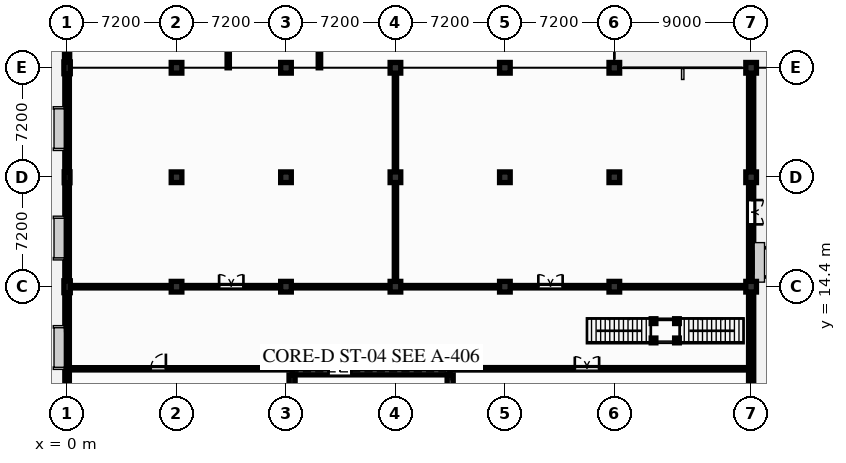
"""IFC4 building model, lengths in metres.
Left out: names, types, materials, properties, quantities, classifications, styles, units other than length and angle.
Written with IfcOpenShell. Run it as: python <this file> out.ifc"""

import sys

from ifc_helpers import new_model, si_unit, direction, frame, frame_2d, origin, origin_2d, place, context, subcontext, project, spatial, rectangle, i_section, extrude, element, fill, save


model = new_model("IFC4")
c1 = context("Model", 3, precision=1e-05, world=origin(), true_north=direction((0.0, 1.0)))
c2 = subcontext(c1, "Body", "Model", "MODEL_VIEW")
j1 = project(units=[si_unit("LENGTHUNIT", "METRE"), si_unit("PLANEANGLEUNIT", "RADIAN")], contexts=[c1])
p1 = place(None, origin())
s1 = spatial("IfcSite", under=j1, at=p1, CompositionType="ELEMENT")
p2 = place(p1, origin())
s2 = spatial("IfcBuilding", under=s1, at=p2, CompositionType="ELEMENT")
p3 = place(p2, origin())
s3 = spatial("IfcBuildingStorey", under=s2, at=p3, CompositionType="ELEMENT", Elevation=0.0)
p4 = place(p3, frame((0.0, 14.4, 0.0), z_axis=(0.0, 0.0, 1.0), x_axis=(1.0, 0.0, 0.0)))
e1 = element("IfcColumn", 1, at=p4, inside=s3, PredefinedType="PILASTER", context=c2, shape_type="SweptSolid", body=[
    extrude(rectangle(XDim=0.42, YDim=0.78, at=origin_2d()), origin(), (0.0, 0.0, 1.0), 5.1),
])
p5 = place(p3, frame((0.0, 21.6, 0.0), z_axis=(0.0, 0.0, 1.0), x_axis=(1.0, 0.0, 0.0)))
e2 = element("IfcColumn", 2, at=p5, inside=s3, PredefinedType="PILASTER", context=c2, shape_type="SweptSolid", body=[
    extrude(rectangle(XDim=0.38, YDim=0.72, at=origin_2d()), origin(), (0.0, 0.0, 1.0), 5.1),
])
p6 = place(p3, frame((0.0, 28.8, 0.0), z_axis=(0.0, 0.0, 1.0), x_axis=(1.0, 0.0, 0.0)))
e3 = element("IfcColumn", 3, at=p6, inside=s3, PredefinedType="PILASTER", context=c2, shape_type="SweptSolid", body=[
    extrude(rectangle(XDim=0.42, YDim=0.78, at=origin_2d()), origin(), (0.0, 0.0, 1.0), 5.1),
])
for number, where, z_axis, x_axis in (
    (4, (7.2, 14.4, 0.0), (0.0, 0.0, 1.0), (1.0, 0.0, 0.0)),
    (5, (7.2, 21.6, 0.0), (0.0, 0.0, 1.0), (1.0, 0.0, 0.0)),
    (6, (7.2, 28.8, 0.0), (0.0, 0.0, 1.0), (1.0, 0.0, 0.0)),
    (7, (14.4, 14.4, 0.0), (0.0, 0.0, 1.0), (1.0, 0.0, 0.0)),
    (8, (14.4, 21.6, 0.0), (0.0, 0.0, 1.0), (1.0, 0.0, 0.0)),
    (9, (14.4, 28.8, 0.0), (0.0, 0.0, 1.0), (1.0, 0.0, 0.0)),
    (10, (21.6, 14.4, 0.0), (0.0, 0.0, 1.0), (1.0, 0.0, 0.0)),
    (11, (21.6, 21.6, 0.0), (0.0, 0.0, 1.0), (1.0, 0.0, 0.0)),
    (12, (21.6, 28.8, 0.0), (0.0, 0.0, 1.0), (1.0, 0.0, 0.0)),
    (13, (28.8, 14.4, 0.0), (0.0, 0.0, 1.0), (1.0, 0.0, 0.0)),
    (14, (28.8, 21.6, 0.0), (0.0, 0.0, 1.0), (1.0, 0.0, 0.0)),
    (15, (28.8, 28.8, 0.0), (0.0, 0.0, 1.0), (1.0, 0.0, 0.0)),
    (16, (36.0, 14.4, 0.0), (0.0, 0.0, 1.0), (1.0, 0.0, 0.0)),
    (17, (36.0, 21.6, 0.0), (0.0, 0.0, 1.0), (1.0, 0.0, 0.0)),
    (18, (36.0, 28.8, 0.0), (0.0, 0.0, 1.0), (1.0, 0.0, 0.0)),
    (19, (45.0, 14.4, 0.0), (0.0, 0.0, 1.0), (1.0, 0.0, 0.0)),
    (20, (45.0, 21.6, 0.0), (0.0, 0.0, 1.0), (1.0, 0.0, 0.0)),
    (21, (45.0, 28.8, 0.0), (0.0, 0.0, 1.0), (1.0, 0.0, 0.0)),
):
    element("IfcColumn", number, at=place(p3, frame(where, z_axis=z_axis, x_axis=x_axis)), inside=s3, PredefinedType="COLUMN", context=c2, shape_type="SweptSolid", body=[
        extrude(rectangle(XDim=0.7, YDim=0.7, at=origin_2d()), origin(), (0.0, 0.0, 1.0), 5.1),
    ])
for number, where, z_axis, x_axis in (
    (22, (38.58, 10.865, 0.0), (0.0, 0.0, 1.0), (1.0, 0.0, 0.0)),
    (23, (40.12, 10.865, 0.0), (0.0, 0.0, 1.0), (1.0, 0.0, 0.0)),
    (24, (38.58, 12.135, 0.0), (0.0, 0.0, 1.0), (1.0, 0.0, 0.0)),
    (25, (40.12, 12.135, 0.0), (0.0, 0.0, 1.0), (1.0, 0.0, 0.0)),
):
    element("IfcColumn", number, at=place(p3, frame(where, z_axis=z_axis, x_axis=x_axis)), inside=s3, PredefinedType="COLUMN", context=c2, shape_type="SweptSolid", body=[
        extrude(i_section(OverallWidth=0.307, OverallDepth=0.315, WebThickness=0.012, FlangeThickness=0.019, at=origin_2d()), origin(), (0.0, 0.0, 1.0), 2.33),
    ])
p7 = place(p3, frame((0.0, 28.8, 0.0), z_axis=(0.0, 0.0, 1.0), x_axis=(0.0, 1.0, 0.0)))
e26 = element("IfcWall", 26, at=p7, inside=s3, PredefinedType="SOLIDWALL", context=c2, shape_type="SweptSolid", body=[
    extrude(rectangle(XDim=7.2, YDim=0.34, at=frame_2d((3.6, 0.0))), origin(), (0.0, 0.0, 1.0), 4.8),
])
p8 = place(p7, frame((1.5, 0.0, 0.85)))
e27 = element("IfcOpeningElement", 27, at=p8, cuts=e26, PredefinedType="OPENING", context=c2, shape_type="SweptSolid", body=[
    extrude(rectangle(XDim=1.65, YDim=2.25, at=frame_2d((0.825, 1.125))), frame((0.0, 0.18, 0.0), z_axis=(0.0, -1.0, 0.0), x_axis=(1.0, 0.0, 0.0)), (0.0, 0.0, 1.0), 0.36),
])
p9 = place(p7, frame((4.3, 0.0, 0.85)))
e28 = element("IfcOpeningElement", 28, at=p9, cuts=e26, PredefinedType="OPENING", context=c2, shape_type="SweptSolid", body=[
    extrude(rectangle(XDim=1.65, YDim=2.25, at=frame_2d((0.825, 1.125))), frame((0.0, 0.18, 0.0), z_axis=(0.0, -1.0, 0.0), x_axis=(1.0, 0.0, 0.0)), (0.0, 0.0, 1.0), 0.36),
])
p10 = place(p3, frame((0.0, 7.2, 0.0), z_axis=(0.0, 0.0, 1.0), x_axis=(0.0, 1.0, 0.0)))
e29 = element("IfcWall", 29, at=p10, inside=s3, PredefinedType="SOLIDWALL", context=c2, shape_type="SweptSolid", body=[
    extrude(rectangle(XDim=7.2, YDim=0.3, at=frame_2d((3.6, 0.0))), origin(), (0.0, 0.0, 1.0), 4.115),
])
p11 = place(p10, frame((4.2, 0.0, 0.9)))
e30 = element("IfcOpeningElement", 30, at=p11, cuts=e29, PredefinedType="OPENING", context=c2, shape_type="SweptSolid", body=[
    extrude(rectangle(XDim=2.4, YDim=2.4, at=frame_2d((1.2, 1.2))), frame((0.0, 0.16, 0.0), z_axis=(0.0, -1.0, 0.0), x_axis=(1.0, 0.0, 0.0)), (0.0, 0.0, 1.0), 0.32),
])
p12 = place(p3, frame((0.0, 14.4, 0.0), z_axis=(0.0, 0.0, 1.0), x_axis=(0.0, 1.0, 0.0)))
e31 = element("IfcWall", 31, at=p12, inside=s3, PredefinedType="SOLIDWALL", context=c2, shape_type="SweptSolid", body=[
    extrude(rectangle(XDim=7.2, YDim=0.3, at=frame_2d((3.6, 0.0))), origin(), (0.0, 0.0, 1.0), 4.115),
])
p13 = place(p12, frame((2.0, 0.0, 0.9)))
e32 = element("IfcOpeningElement", 32, at=p13, cuts=e31, PredefinedType="OPENING", context=c2, shape_type="SweptSolid", body=[
    extrude(rectangle(XDim=2.4, YDim=2.4, at=frame_2d((1.2, 1.2))), frame((0.0, 0.16, 0.0), z_axis=(0.0, -1.0, 0.0), x_axis=(1.0, 0.0, 0.0)), (0.0, 0.0, 1.0), 0.32),
])
p14 = place(p3, frame((0.0, 21.6, 0.0), z_axis=(0.0, 0.0, 1.0), x_axis=(0.0, 1.0, 0.0)))
e33 = element("IfcWall", 33, at=p14, inside=s3, PredefinedType="SOLIDWALL", context=c2, shape_type="SweptSolid", body=[
    extrude(rectangle(XDim=7.2, YDim=0.3, at=frame_2d((3.6, 0.0))), origin(), (0.0, 0.0, 1.0), 4.115),
])
p15 = place(p14, frame((2.0, 0.0, 0.9)))
e34 = element("IfcOpeningElement", 34, at=p15, cuts=e33, PredefinedType="OPENING", context=c2, shape_type="SweptSolid", body=[
    extrude(rectangle(XDim=2.4, YDim=2.4, at=frame_2d((1.2, 1.2))), frame((0.0, 0.16, 0.0), z_axis=(0.0, -1.0, 0.0), x_axis=(1.0, 0.0, 0.0)), (0.0, 0.0, 1.0), 0.32),
])
p16 = place(p3, frame((45.0, 0.0, 0.0), z_axis=(0.0, 0.0, 1.0), x_axis=(0.0, 1.0, 0.0)))
e35 = element("IfcWall", 35, at=p16, inside=s3, PredefinedType="SOLIDWALL", context=c2, shape_type="SweptSolid", body=[
    extrude(rectangle(XDim=28.8, YDim=0.34, at=frame_2d((14.4, 0.0))), origin(), (0.0, 0.0, 1.0), 4.8),
])
p17 = place(p16, frame((18.5, 0.0, 0.0)))
e36 = element("IfcOpeningElement", 36, at=p17, cuts=e35, PredefinedType="OPENING", context=c2, shape_type="SweptSolid", body=[
    extrude(rectangle(XDim=1.6, YDim=2.4, at=frame_2d((0.8, 1.2))), frame((0.0, 0.18, 0.0), z_axis=(0.0, -1.0, 0.0), x_axis=(1.0, 0.0, 0.0)), (0.0, 0.0, 1.0), 0.36),
])
p18 = place(p16, frame((2.8, 0.0, 0.9)))
e37 = element("IfcOpeningElement", 37, at=p18, cuts=e35, PredefinedType="OPENING", context=c2, shape_type="SweptSolid", body=[
    extrude(rectangle(XDim=2.4, YDim=2.4, at=frame_2d((1.2, 1.2))), frame((0.0, 0.18, 0.0), z_axis=(0.0, -1.0, 0.0), x_axis=(1.0, 0.0, 0.0)), (0.0, 0.0, 1.0), 0.36),
])
p19 = place(p16, frame((15.2, 0.0, 0.9)))
e38 = element("IfcOpeningElement", 38, at=p19, cuts=e35, PredefinedType="OPENING", context=c2, shape_type="SweptSolid", body=[
    extrude(rectangle(XDim=1.6, YDim=2.05, at=frame_2d((0.8, 1.025))), frame((0.0, 0.18, 0.0), z_axis=(0.0, -1.0, 0.0), x_axis=(1.0, 0.0, 0.0)), (0.0, 0.0, 1.0), 0.36),
])
p20 = place(p3, frame((14.8, 8.8, 0.0), z_axis=(0.0, 0.0, 1.0), x_axis=(1.0, 0.0, 0.0)))
e39 = element("IfcWall", 39, at=p20, inside=s3, PredefinedType="SHEAR", context=c2, shape_type="SweptSolid", body=[
    extrude(rectangle(XDim=10.4, YDim=0.4, at=frame_2d((5.2, 0.0))), origin(), (0.0, 0.0, 1.0), 4.8),
])
p21 = place(p20, frame((2.4, 0.0, 0.0)))
e40 = element("IfcOpeningElement", 40, at=p21, cuts=e39, PredefinedType="OPENING", context=c2, shape_type="SweptSolid", body=[
    extrude(rectangle(XDim=1.5, YDim=2.2, at=frame_2d((0.75, 1.1))), frame((0.0, 0.21, 0.0), z_axis=(0.0, -1.0, 0.0), x_axis=(1.0, 0.0, 0.0)), (0.0, 0.0, 1.0), 0.42),
])
for number, where, z_axis, x_axis in (
    (41, (14.8, 0.17, 0.0), (0.0, 0.0, 1.0), (0.0, 1.0, 0.0)),
    (42, (25.2, 0.17, 0.0), (0.0, 0.0, 1.0), (0.0, 1.0, 0.0)),
):
    element("IfcWall", number, at=place(p3, frame(where, z_axis=z_axis, x_axis=x_axis)), inside=s3, PredefinedType="SHEAR", context=c2, shape_type="SweptSolid", body=[
        extrude(rectangle(XDim=8.43, YDim=0.4, at=frame_2d((4.215, 0.0))), origin(), (0.0, 0.0, 1.0), 4.8),
    ])
p22 = place(p3, frame((16.6, 28.8, 0.0), z_axis=(0.0, 0.0, 1.0), x_axis=(0.0, 1.0, 0.0)))
e43 = element("IfcWall", 43, at=p22, inside=s3, PredefinedType="PARTITIONING", context=c2, shape_type="SweptSolid", body=[
    extrude(rectangle(XDim=14.4, YDim=0.16, at=frame_2d((7.2, 0.0))), origin(), (0.0, 0.0, 1.0), 4.348),
])
p23 = place(p22, frame((6.4, 0.0, 0.0)))
e44 = element("IfcOpeningElement", 44, at=p23, cuts=e43, PredefinedType="OPENING", context=c2, shape_type="SweptSolid", body=[
    extrude(rectangle(XDim=1.6, YDim=2.2, at=frame_2d((0.8, 1.1))), frame((0.0, 0.09, 0.0), z_axis=(0.0, -1.0, 0.0), x_axis=(1.0, 0.0, 0.0)), (0.0, 0.0, 1.0), 0.18),
])
p24 = place(p3, frame((10.6, 28.8, 0.0), z_axis=(0.0, 0.0, 1.0), x_axis=(0.0, 1.0, 0.0)))
e45 = element("IfcWall", 45, at=p24, inside=s3, PredefinedType="PARTITIONING", context=c2, shape_type="SweptSolid", body=[
    extrude(rectangle(XDim=27.2, YDim=0.15, at=frame_2d((13.6, 0.0))), origin(), (0.0, 0.0, 1.0), 4.459),
])
p25 = place(p24, frame((11.0, 0.0, 0.0)))
e46 = element("IfcOpeningElement", 46, at=p25, cuts=e45, PredefinedType="OPENING", context=c2, shape_type="SweptSolid", body=[
    extrude(rectangle(XDim=1.0, YDim=2.15, at=frame_2d((0.5, 1.075))), frame((0.0, 0.085, 0.0), z_axis=(0.0, -1.0, 0.0), x_axis=(1.0, 0.0, 0.0)), (0.0, 0.0, 1.0), 0.17),
])
p26 = place(p3, frame((25.4, 9.0, 0.0), z_axis=(0.0, 0.0, 1.0), x_axis=(1.0, 0.0, 0.0)))
e47 = element("IfcWall", 47, at=p26, inside=s3, PredefinedType="PARTITIONING", context=c2, shape_type="SweptSolid", body=[
    extrude(rectangle(XDim=19.6, YDim=0.16, at=frame_2d((9.8, 0.0))), origin(), (0.0, 0.0, 1.0), 4.8),
])
p27 = place(p26, frame((8.0, 0.0, 0.0)))
e48 = element("IfcOpeningElement", 48, at=p27, cuts=e47, PredefinedType="OPENING", context=c2, shape_type="SweptSolid", body=[
    extrude(rectangle(XDim=1.6, YDim=2.2, at=frame_2d((0.8, 1.1))), frame((0.0, 0.09, 0.0), z_axis=(0.0, -1.0, 0.0), x_axis=(1.0, 0.0, 0.0)), (0.0, 0.0, 1.0), 0.18),
])
p28 = place(p3, frame((0.0, 9.0, 0.0), z_axis=(0.0, 0.0, 1.0), x_axis=(1.0, 0.0, 0.0)))
e49 = element("IfcWall", 49, at=p28, inside=s3, PredefinedType="PARTITIONING", context=c2, shape_type="SweptSolid", body=[
    extrude(rectangle(XDim=14.6, YDim=0.15, at=frame_2d((7.3, 0.0))), origin(), (0.0, 0.0, 1.0), 4.8),
])
p29 = place(p28, frame((5.5, 0.0, 0.0)))
e50 = element("IfcOpeningElement", 50, at=p29, cuts=e49, PredefinedType="OPENING", context=c2, shape_type="SweptSolid", body=[
    extrude(rectangle(XDim=1.0, YDim=2.15, at=frame_2d((0.5, 1.075))), frame((0.0, 0.085, 0.0), z_axis=(0.0, -1.0, 0.0), x_axis=(1.0, 0.0, 0.0)), (0.0, 0.0, 1.0), 0.17),
])
p30 = place(p3, frame((0.0, 14.4, 0.0), z_axis=(0.0, 0.0, 1.0), x_axis=(1.0, 0.0, 0.0)))
e51 = element("IfcWall", 51, at=p30, inside=s3, PredefinedType="PARTITIONING", context=c2, shape_type="SweptSolid", body=[
    extrude(rectangle(XDim=45.0, YDim=0.16, at=frame_2d((22.5, 0.0))), origin(), (0.0, 0.0, 1.0), 4.065),
])
p31 = place(p30, frame((10.0, 0.0, 0.0)))
e52 = element("IfcOpeningElement", 52, at=p31, cuts=e51, PredefinedType="OPENING", context=c2, shape_type="SweptSolid", body=[
    extrude(rectangle(XDim=1.6, YDim=2.2, at=frame_2d((0.8, 1.1))), frame((0.0, 0.09, 0.0), z_axis=(0.0, -1.0, 0.0), x_axis=(1.0, 0.0, 0.0)), (0.0, 0.0, 1.0), 0.18),
])
p32 = place(p30, frame((31.0, 0.0, 0.0)))
e53 = element("IfcOpeningElement", 53, at=p32, cuts=e51, PredefinedType="OPENING", context=c2, shape_type="SweptSolid", body=[
    extrude(rectangle(XDim=1.6, YDim=2.2, at=frame_2d((0.8, 1.1))), frame((0.0, 0.09, 0.0), z_axis=(0.0, -1.0, 0.0), x_axis=(1.0, 0.0, 0.0)), (0.0, 0.0, 1.0), 0.18),
])
p33 = place(p3, frame((21.6, 14.4, 0.0), z_axis=(0.0, 0.0, 1.0), x_axis=(0.0, 1.0, 0.0)))
e54 = element("IfcWall", 54, at=p33, inside=s3, PredefinedType="PARTITIONING", context=c2, shape_type="SweptSolid", body=[
    extrude(rectangle(XDim=14.4, YDim=0.15, at=frame_2d((7.2, 0.0))), origin(), (0.0, 0.0, 1.0), 4.015),
])
p34 = place(p11, origin())
e55 = element("IfcWindow", 55, at=p34, inside=s3, PartitioningType="SINGLE_PANEL", PredefinedType="WINDOW", context=c2, shape_type="SweptSolid", body=[
    extrude(rectangle(XDim=2.4, YDim=2.4, at=frame_2d((1.2, 1.2))), frame((0.0, 0.03, 0.0), z_axis=(0.0, -1.0, 0.0), x_axis=(1.0, 0.0, 0.0)), (0.0, 0.0, 1.0), 0.06),
])
fill(e30, e55)
p35 = place(p13, origin())
e56 = element("IfcWindow", 56, at=p35, inside=s3, PartitioningType="SINGLE_PANEL", PredefinedType="WINDOW", context=c2, shape_type="SweptSolid", body=[
    extrude(rectangle(XDim=2.4, YDim=2.4, at=frame_2d((1.2, 1.2))), frame((0.0, 0.03, 0.0), z_axis=(0.0, -1.0, 0.0), x_axis=(1.0, 0.0, 0.0)), (0.0, 0.0, 1.0), 0.06),
])
fill(e32, e56)
p36 = place(p15, origin())
e57 = element("IfcWindow", 57, at=p36, inside=s3, PartitioningType="SINGLE_PANEL", PredefinedType="WINDOW", context=c2, shape_type="SweptSolid", body=[
    extrude(rectangle(XDim=2.4, YDim=2.4, at=frame_2d((1.2, 1.2))), frame((0.0, 0.03, 0.0), z_axis=(0.0, -1.0, 0.0), x_axis=(1.0, 0.0, 0.0)), (0.0, 0.0, 1.0), 0.06),
])
fill(e34, e57)
p37 = place(p17, frame((1.6, 0.0, 0.0), z_axis=(0.0, 0.0, 1.0), x_axis=(-1.0, 0.0, 0.0)))
e58 = element("IfcDoor", 58, at=p37, inside=s3, OperationType="DOUBLE_DOOR_SINGLE_SWING", PredefinedType="DOOR", context=c2, shape_type="SweptSolid", body=[
    extrude(rectangle(XDim=1.6, YDim=2.4, at=frame_2d((0.8, 1.2))), frame((0.0, 0.025, 0.0), z_axis=(0.0, -1.0, 0.0), x_axis=(1.0, 0.0, 0.0)), (0.0, 0.0, 1.0), 0.05),
])
fill(e36, e58)
p38 = place(p19, origin())
e59 = element("IfcWindow", 59, at=p38, inside=s3, PartitioningType="SINGLE_PANEL", PredefinedType="WINDOW", context=c2, shape_type="SweptSolid", body=[
    extrude(rectangle(XDim=1.6, YDim=2.05, at=frame_2d((0.8, 1.025))), frame((0.0, 0.03, 0.0), z_axis=(0.0, -1.0, 0.0), x_axis=(1.0, 0.0, 0.0)), (0.0, 0.0, 1.0), 0.06),
])
fill(e38, e59)
p39 = place(p21, origin())
e60 = element("IfcDoor", 60, at=p39, inside=s3, OperationType="DOUBLE_DOOR_SINGLE_SWING", PredefinedType="DOOR", context=c2, shape_type="SweptSolid", body=[
    extrude(rectangle(XDim=1.5, YDim=2.2, at=frame_2d((0.75, 1.1))), frame((0.0, 0.025, 0.0), z_axis=(0.0, -1.0, 0.0), x_axis=(1.0, 0.0, 0.0)), (0.0, 0.0, 1.0), 0.05),
])
fill(e40, e60)
p40 = place(p27, origin())
e61 = element("IfcDoor", 61, at=p40, inside=s3, OperationType="DOUBLE_DOOR_SINGLE_SWING", PredefinedType="DOOR", context=c2, shape_type="SweptSolid", body=[
    extrude(rectangle(XDim=1.6, YDim=2.2, at=frame_2d((0.8, 1.1))), frame((0.0, 0.025, 0.0), z_axis=(0.0, -1.0, 0.0), x_axis=(1.0, 0.0, 0.0)), (0.0, 0.0, 1.0), 0.05),
])
fill(e48, e61)
p41 = place(p29, origin())
e62 = element("IfcDoor", 62, at=p41, inside=s3, OperationType="SINGLE_SWING_RIGHT", PredefinedType="DOOR", context=c2, shape_type="SweptSolid", body=[
    extrude(rectangle(XDim=1.0, YDim=2.15, at=frame_2d((0.5, 1.075))), frame((0.0, 0.025, 0.0), z_axis=(0.0, -1.0, 0.0), x_axis=(1.0, 0.0, 0.0)), (0.0, 0.0, 1.0), 0.05),
])
fill(e50, e62)
p42 = place(p31, origin())
e63 = element("IfcDoor", 63, at=p42, inside=s3, OperationType="DOUBLE_DOOR_SINGLE_SWING", PredefinedType="DOOR", context=c2, shape_type="SweptSolid", body=[
    extrude(rectangle(XDim=1.6, YDim=2.2, at=frame_2d((0.8, 1.1))), frame((0.0, 0.025, 0.0), z_axis=(0.0, -1.0, 0.0), x_axis=(1.0, 0.0, 0.0)), (0.0, 0.0, 1.0), 0.05),
])
fill(e52, e63)
p43 = place(p32, origin())
e64 = element("IfcDoor", 64, at=p43, inside=s3, OperationType="DOUBLE_DOOR_SINGLE_SWING", PredefinedType="DOOR", context=c2, shape_type="SweptSolid", body=[
    extrude(rectangle(XDim=1.6, YDim=2.2, at=frame_2d((0.8, 1.1))), frame((0.0, 0.025, 0.0), z_axis=(0.0, -1.0, 0.0), x_axis=(1.0, 0.0, 0.0)), (0.0, 0.0, 1.0), 0.05),
])
fill(e53, e64)
save(model, sys.argv[1])
